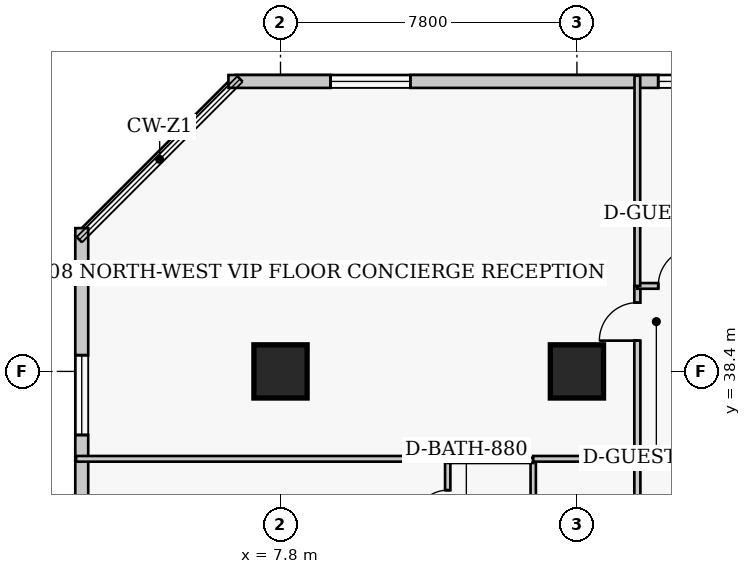
"""IFC4 building model, lengths in metres.
Left out: names, types, materials, properties, quantities, classifications, styles, units other than length and angle.
Written with IfcOpenShell. Run it as: python <this file> out.ifc"""

import sys

from ifc_helpers import new_model, si_unit, direction, frame, frame_2d, origin, origin_2d, place, context, subcontext, project, spatial, rectangle, extrude, element, fill, save


model = new_model("IFC4")
c1 = context("Model", 3, precision=1e-05, world=origin(), true_north=direction((0.0, 1.0)))
c2 = subcontext(c1, "Body", "Model", "MODEL_VIEW")
j1 = project(units=[si_unit("LENGTHUNIT", "METRE"), si_unit("PLANEANGLEUNIT", "RADIAN")], contexts=[c1])
p1 = place(None, origin())
s1 = spatial("IfcSite", under=j1, at=p1, CompositionType="ELEMENT")
p2 = place(p1, origin())
s2 = spatial("IfcBuilding", under=s1, at=p2, CompositionType="ELEMENT")
p3 = place(p2, frame((0.0, 0.0, 37.4)))
s3 = spatial("IfcBuildingStorey", under=s2, at=p3, CompositionType="ELEMENT", Elevation=37.4)
for number, where, z_axis, x_axis in (
    (1, (7.8, 38.4, 0.0), (0.0, 0.0, 1.0), (1.0, 0.0, 0.0)),
    (2, (15.6, 38.4, 0.0), (0.0, 0.0, 1.0), (1.0, 0.0, 0.0)),
):
    element("IfcColumn", number, at=place(p3, frame(where, z_axis=z_axis, x_axis=x_axis)), inside=s3, PredefinedType="COLUMN", context=c2, shape_type="SweptSolid", body=[
        extrude(rectangle(XDim=1.4, YDim=1.4, at=origin_2d()), origin(), (0.0, 0.0, 1.0), 3.8),
    ])
p4 = place(p3, frame((36.32, 46.03, 0.0), z_axis=(0.0, 0.0, 1.0), x_axis=(-1.0, 0.0, 0.0)))
e3 = element("IfcWall", 3, at=p4, inside=s3, PredefinedType="SOLIDWALL", context=c2, shape_type="SweptSolid", body=[
    extrude(rectangle(XDim=29.89, YDim=0.34, at=frame_2d((14.945, 0.0))), origin(), (0.0, 0.0, 1.0), 3.54),
])
p5 = place(p4, frame((2.686, 0.0, 0.85)))
e4 = element("IfcOpeningElement", 4, at=p5, cuts=e3, PredefinedType="OPENING", context=c2, shape_type="SweptSolid", body=[
    extrude(rectangle(XDim=2.1, YDim=1.85, at=frame_2d((1.05, 0.925))), frame((0.0, 0.18, 0.0), z_axis=(0.0, -1.0, 0.0), x_axis=(1.0, 0.0, 0.0)), (0.0, 0.0, 1.0), 0.36),
])
p6 = place(p4, frame((10.159, 0.0, 0.85)))
e5 = element("IfcOpeningElement", 5, at=p6, cuts=e3, PredefinedType="OPENING", context=c2, shape_type="SweptSolid", body=[
    extrude(rectangle(XDim=2.1, YDim=1.85, at=frame_2d((1.05, 0.925))), frame((0.0, 0.18, 0.0), z_axis=(0.0, -1.0, 0.0), x_axis=(1.0, 0.0, 0.0)), (0.0, 0.0, 1.0), 0.36),
])
p7 = place(p4, frame((16.481, 0.0, 0.85)))
e6 = element("IfcOpeningElement", 6, at=p7, cuts=e3, PredefinedType="OPENING", context=c2, shape_type="SweptSolid", body=[
    extrude(rectangle(XDim=2.1, YDim=1.85, at=frame_2d((1.05, 0.925))), frame((0.0, 0.18, 0.0), z_axis=(0.0, -1.0, 0.0), x_axis=(1.0, 0.0, 0.0)), (0.0, 0.0, 1.0), 0.36),
])
p8 = place(p4, frame((25.104, 0.0, 0.85)))
e7 = element("IfcOpeningElement", 7, at=p8, cuts=e3, PredefinedType="OPENING", context=c2, shape_type="SweptSolid", body=[
    extrude(rectangle(XDim=2.1, YDim=1.85, at=frame_2d((1.05, 0.925))), frame((0.0, 0.18, 0.0), z_axis=(0.0, -1.0, 0.0), x_axis=(1.0, 0.0, 0.0)), (0.0, 0.0, 1.0), 0.36),
])
p9 = place(p3, frame((2.57, 42.17, 0.0), z_axis=(0.0, 0.0, 1.0), x_axis=(0.0, -1.0, 0.0)))
e8 = element("IfcWall", 8, at=p9, inside=s3, PredefinedType="SOLIDWALL", context=c2, shape_type="SweptSolid", body=[
    extrude(rectangle(XDim=35.14, YDim=0.34, at=frame_2d((17.57, 0.0))), origin(), (0.0, 0.0, 1.0), 3.54),
])
p10 = place(p9, frame((3.343, 0.0, 0.85)))
e9 = element("IfcOpeningElement", 9, at=p10, cuts=e8, PredefinedType="OPENING", context=c2, shape_type="SweptSolid", body=[
    extrude(rectangle(XDim=2.1, YDim=1.85, at=frame_2d((1.05, 0.925))), frame((0.0, 0.18, 0.0), z_axis=(0.0, -1.0, 0.0), x_axis=(1.0, 0.0, 0.0)), (0.0, 0.0, 1.0), 0.36),
])
p11 = place(p9, frame((10.978, 0.0, 0.85)))
e10 = element("IfcOpeningElement", 10, at=p11, cuts=e8, PredefinedType="OPENING", context=c2, shape_type="SweptSolid", body=[
    extrude(rectangle(XDim=2.1, YDim=1.85, at=frame_2d((1.05, 0.925))), frame((0.0, 0.18, 0.0), z_axis=(0.0, -1.0, 0.0), x_axis=(1.0, 0.0, 0.0)), (0.0, 0.0, 1.0), 0.36),
])
p12 = place(p9, frame((19.762, 0.0, 0.85)))
e11 = element("IfcOpeningElement", 11, at=p12, cuts=e8, PredefinedType="OPENING", context=c2, shape_type="SweptSolid", body=[
    extrude(rectangle(XDim=2.1, YDim=1.85, at=frame_2d((1.05, 0.925))), frame((0.0, 0.18, 0.0), z_axis=(0.0, -1.0, 0.0), x_axis=(1.0, 0.0, 0.0)), (0.0, 0.0, 1.0), 0.36),
])
p13 = place(p9, frame((28.548, 0.0, 0.85)))
e12 = element("IfcOpeningElement", 12, at=p13, cuts=e8, PredefinedType="OPENING", context=c2, shape_type="SweptSolid", body=[
    extrude(rectangle(XDim=2.1, YDim=1.85, at=frame_2d((1.05, 0.925))), frame((0.0, 0.18, 0.0), z_axis=(0.0, -1.0, 0.0), x_axis=(1.0, 0.0, 0.0)), (0.0, 0.0, 1.0), 0.36),
])
p14 = place(p3, frame((17.19, 5.05, 0.0), z_axis=(0.0, 0.0, 1.0), x_axis=(0.0, 1.0, 0.0)))
e13 = element("IfcWall", 13, at=p14, inside=s3, PredefinedType="PARTITIONING", context=c2, shape_type="SweptSolid", body=[
    extrude(rectangle(XDim=35.6, YDim=0.16, at=frame_2d((17.8, 0.0))), origin(), (0.0, 0.0, 1.0), 3.54),
])
p15 = place(p14, frame((2.6, 0.0, 0.0)))
e14 = element("IfcOpeningElement", 14, at=p15, cuts=e13, PredefinedType="OPENING", context=c2, shape_type="SweptSolid", body=[
    extrude(rectangle(XDim=0.95, YDim=2.1, at=frame_2d((0.475, 1.05))), frame((0.0, 0.09, 0.0), z_axis=(0.0, -1.0, 0.0), x_axis=(1.0, 0.0, 0.0)), (0.0, 0.0, 1.0), 0.18),
])
p16 = place(p14, frame((10.075, 0.0, 0.0)))
e15 = element("IfcOpeningElement", 15, at=p16, cuts=e13, PredefinedType="OPENING", context=c2, shape_type="SweptSolid", body=[
    extrude(rectangle(XDim=0.95, YDim=2.1, at=frame_2d((0.475, 1.05))), frame((0.0, 0.09, 0.0), z_axis=(0.0, -1.0, 0.0), x_axis=(1.0, 0.0, 0.0)), (0.0, 0.0, 1.0), 0.18),
])
p17 = place(p14, frame((18.875, 0.0, 0.0)))
e16 = element("IfcOpeningElement", 16, at=p17, cuts=e13, PredefinedType="OPENING", context=c2, shape_type="SweptSolid", body=[
    extrude(rectangle(XDim=0.95, YDim=2.1, at=frame_2d((0.475, 1.05))), frame((0.0, 0.09, 0.0), z_axis=(0.0, -1.0, 0.0), x_axis=(1.0, 0.0, 0.0)), (0.0, 0.0, 1.0), 0.18),
])
p18 = place(p14, frame((26.925, 0.0, 0.0)))
e17 = element("IfcOpeningElement", 17, at=p18, cuts=e13, PredefinedType="OPENING", context=c2, shape_type="SweptSolid", body=[
    extrude(rectangle(XDim=0.95, YDim=2.1, at=frame_2d((0.475, 1.05))), frame((0.0, 0.09, 0.0), z_axis=(0.0, -1.0, 0.0), x_axis=(1.0, 0.0, 0.0)), (0.0, 0.0, 1.0), 0.18),
])
p19 = place(p14, frame((34.16, 0.0, 0.0)))
e18 = element("IfcOpeningElement", 18, at=p19, cuts=e13, PredefinedType="OPENING", context=c2, shape_type="SweptSolid", body=[
    extrude(rectangle(XDim=1.0, YDim=2.15, at=frame_2d((0.5, 1.075))), frame((0.0, 0.09, 0.0), z_axis=(0.0, -1.0, 0.0), x_axis=(1.0, 0.0, 0.0)), (0.0, 0.0, 1.0), 0.18),
])
p20 = place(p3, frame((17.19, 40.65, 0.0), z_axis=(0.0, 0.0, 1.0), x_axis=(1.0, 0.0, 0.0)))
e19 = element("IfcWall", 19, at=p20, inside=s3, PredefinedType="PARTITIONING", context=c2, shape_type="SweptSolid", body=[
    extrude(rectangle(XDim=4.91, YDim=0.15, at=frame_2d((2.455, 0.0))), origin(), (0.0, 0.0, 1.0), 3.54),
])
p21 = place(p20, frame((0.55, 0.0, 0.0)))
e20 = element("IfcOpeningElement", 20, at=p21, cuts=e19, PredefinedType="OPENING", context=c2, shape_type="SweptSolid", body=[
    extrude(rectangle(XDim=1.0, YDim=2.15, at=frame_2d((0.5, 1.075))), frame((0.0, 0.085, 0.0), z_axis=(0.0, -1.0, 0.0), x_axis=(1.0, 0.0, 0.0)), (0.0, 0.0, 1.0), 0.17),
])
p22 = place(p3, frame((17.19, 40.65, 0.0), z_axis=(0.0, 0.0, 1.0), x_axis=(0.0, 1.0, 0.0)))
e21 = element("IfcWall", 21, at=p22, inside=s3, PredefinedType="PARTITIONING", context=c2, shape_type="SweptSolid", body=[
    extrude(rectangle(XDim=5.53, YDim=0.15, at=frame_2d((2.765, 0.0))), origin(), (0.0, 0.0, 1.0), 3.54),
])
p23 = place(p3, frame((12.2, 33.61, 0.0), z_axis=(0.0, 0.0, 1.0), x_axis=(0.0, 1.0, 0.0)))
e22 = element("IfcWall", 22, at=p23, inside=s3, PredefinedType="PLUMBINGWALL", context=c2, shape_type="SweptSolid", body=[
    extrude(rectangle(XDim=2.45, YDim=0.14, at=frame_2d((1.225, 0.0))), origin(), (0.0, 0.0, 1.0), 3.54),
])
p24 = place(p23, frame((0.785, 0.0, 0.0)))
e23 = element("IfcOpeningElement", 23, at=p24, cuts=e22, PredefinedType="OPENING", context=c2, shape_type="SweptSolid", body=[
    extrude(rectangle(XDim=0.88, YDim=2.05, at=frame_2d((0.44, 1.025))), frame((0.0, 0.08, 0.0), z_axis=(0.0, -1.0, 0.0), x_axis=(1.0, 0.0, 0.0)), (0.0, 0.0, 1.0), 0.16),
])
p25 = place(p3, frame((14.45, 33.61, 0.0), z_axis=(0.0, 0.0, 1.0), x_axis=(0.0, 1.0, 0.0)))
e24 = element("IfcWall", 24, at=p25, inside=s3, PredefinedType="PLUMBINGWALL", context=c2, shape_type="SweptSolid", body=[
    extrude(rectangle(XDim=2.45, YDim=0.14, at=frame_2d((1.225, 0.0))), origin(), (0.0, 0.0, 1.0), 3.54),
])
p26 = place(p3, frame((12.2, 36.06, 0.0), z_axis=(0.0, 0.0, 1.0), x_axis=(1.0, 0.0, 0.0)))
e25 = element("IfcWall", 25, at=p26, inside=s3, PredefinedType="PLUMBINGWALL", context=c2, shape_type="SweptSolid", body=[
    extrude(rectangle(XDim=2.25, YDim=0.14, at=frame_2d((1.125, 0.0))), origin(), (0.0, 0.0, 1.0), 3.54),
])
p27 = place(p3, frame((2.42, 36.1, 0.0), z_axis=(0.0, 0.0, 1.0), x_axis=(1.0, 0.0, 0.0)))
e26 = element("IfcWall", 26, at=p27, inside=s3, PredefinedType="PARTITIONING", context=c2, shape_type="SweptSolid", body=[
    extrude(rectangle(XDim=9.78, YDim=0.15, at=frame_2d((4.89, 0.0))), origin(), (0.0, 0.0, 1.0), 3.54),
])
p28 = place(p3, frame((14.45, 36.1, 0.0), z_axis=(0.0, 0.0, 1.0), x_axis=(1.0, 0.0, 0.0)))
e27 = element("IfcWall", 27, at=p28, inside=s3, PredefinedType="PARTITIONING", context=c2, shape_type="SweptSolid", body=[
    extrude(rectangle(XDim=2.74, YDim=0.15, at=frame_2d((1.37, 0.0))), origin(), (0.0, 0.0, 1.0), 3.54),
])
p29 = place(p7, origin())
e28 = element("IfcWindow", 28, at=p29, inside=s3, PartitioningType="SINGLE_PANEL", PredefinedType="WINDOW", context=c2, shape_type="SweptSolid", body=[
    extrude(rectangle(XDim=2.1, YDim=1.85, at=frame_2d((1.05, 0.925))), frame((0.0, 0.03, 0.0), z_axis=(0.0, -1.0, 0.0), x_axis=(1.0, 0.0, 0.0)), (0.0, 0.0, 1.0), 0.06),
])
fill(e6, e28)
p30 = place(p8, origin())
e29 = element("IfcWindow", 29, at=p30, inside=s3, PartitioningType="SINGLE_PANEL", PredefinedType="WINDOW", context=c2, shape_type="SweptSolid", body=[
    extrude(rectangle(XDim=2.1, YDim=1.85, at=frame_2d((1.05, 0.925))), frame((0.0, 0.03, 0.0), z_axis=(0.0, -1.0, 0.0), x_axis=(1.0, 0.0, 0.0)), (0.0, 0.0, 1.0), 0.06),
])
fill(e7, e29)
p31 = place(p10, origin())
e30 = element("IfcWindow", 30, at=p31, inside=s3, PartitioningType="SINGLE_PANEL", PredefinedType="WINDOW", context=c2, shape_type="SweptSolid", body=[
    extrude(rectangle(XDim=2.1, YDim=1.85, at=frame_2d((1.05, 0.925))), frame((0.0, 0.03, 0.0), z_axis=(0.0, -1.0, 0.0), x_axis=(1.0, 0.0, 0.0)), (0.0, 0.0, 1.0), 0.06),
])
fill(e9, e30)
p32 = place(p21, origin())
e31 = element("IfcDoor", 31, at=p32, inside=s3, OperationType="SINGLE_SWING_RIGHT", PredefinedType="DOOR", context=c2, shape_type="SweptSolid", body=[
    extrude(rectangle(XDim=1.0, YDim=2.15, at=frame_2d((0.5, 1.075))), frame((0.0, 0.025, 0.0), z_axis=(0.0, -1.0, 0.0), x_axis=(1.0, 0.0, 0.0)), (0.0, 0.0, 1.0), 0.05),
])
fill(e20, e31)
p33 = place(p24, origin())
e32 = element("IfcDoor", 32, at=p33, inside=s3, OperationType="SINGLE_SWING_LEFT", PredefinedType="DOOR", context=c2, shape_type="SweptSolid", body=[
    extrude(rectangle(XDim=0.88, YDim=2.05, at=frame_2d((0.44, 1.025))), frame((0.0, 0.025, 0.0), z_axis=(0.0, -1.0, 0.0), x_axis=(1.0, 0.0, 0.0)), (0.0, 0.0, 1.0), 0.05),
])
fill(e23, e32)
p34 = place(p19, origin())
e33 = element("IfcDoor", 33, at=p34, inside=s3, OperationType="SINGLE_SWING_LEFT", PredefinedType="DOOR", context=c2, shape_type="SweptSolid", body=[
    extrude(rectangle(XDim=1.0, YDim=2.15, at=frame_2d((0.5, 1.075))), frame((0.0, 0.025, 0.0), z_axis=(0.0, -1.0, 0.0), x_axis=(1.0, 0.0, 0.0)), (0.0, 0.0, 1.0), 0.05),
])
fill(e18, e33)
save(model, sys.argv[1])
